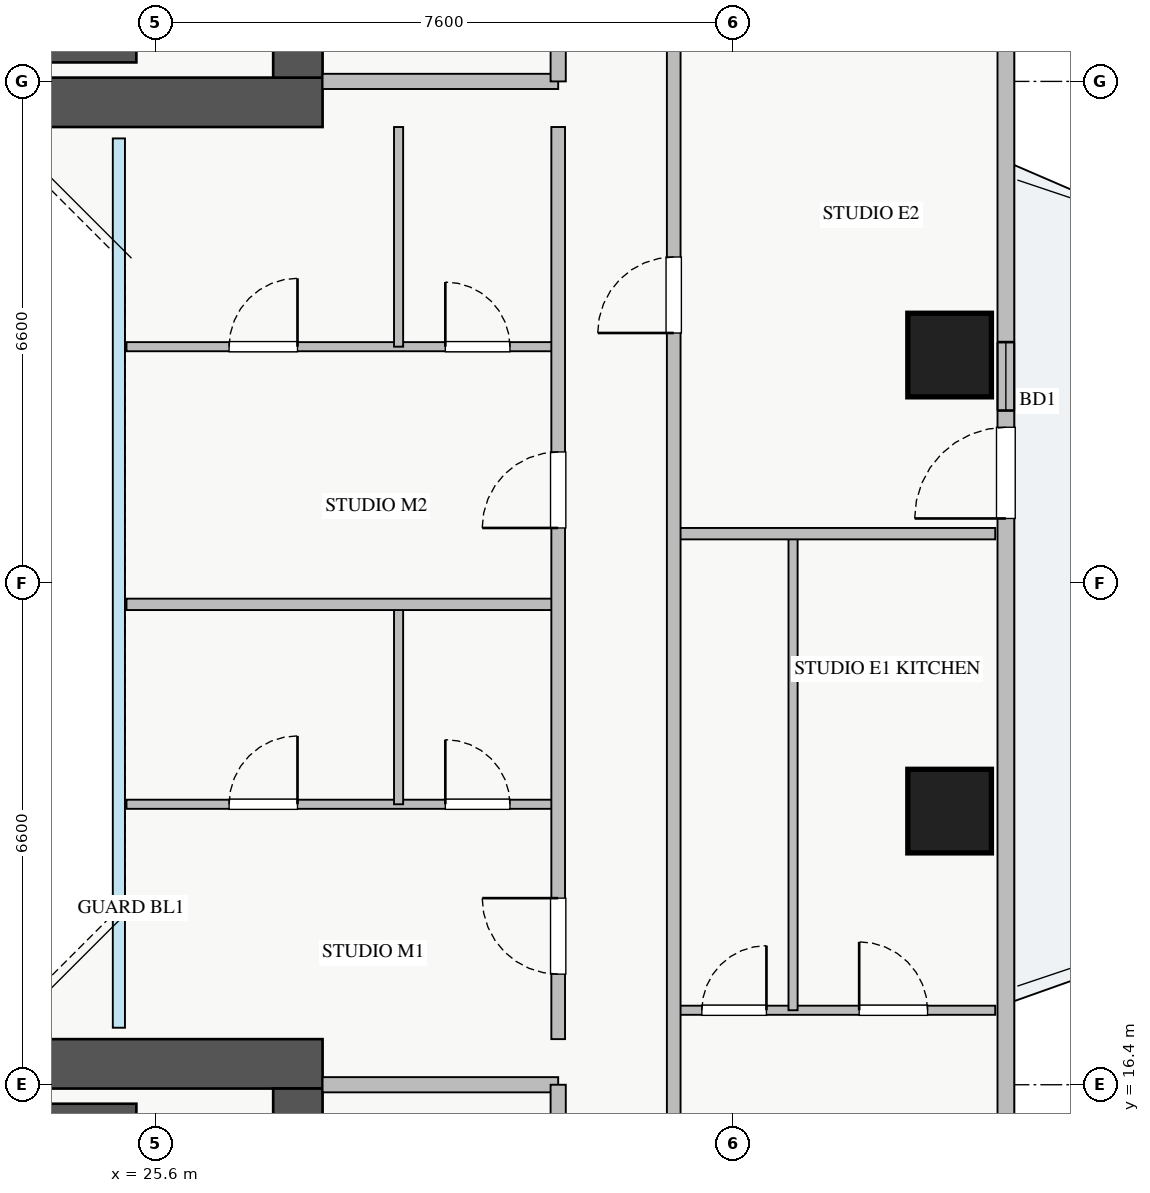
"""IFC4 building model, lengths in metres.
Left out: names, types, materials, properties, quantities, classifications, styles, units other than length and angle.
Written with IfcOpenShell. Run it as: python <this file> out.ifc"""

import sys

from ifc_helpers import new_model, si_unit, direction, frame, frame_2d, origin, origin_2d, place, context, subcontext, project, spatial, rectangle, extrude, source, transform, mapped, element, fill, save


model = new_model("IFC4")
c1 = context("Model", 3, precision=1e-05, world=origin(), true_north=direction((0.0, 1.0)))
c2 = subcontext(c1, "Body", "Model", "MODEL_VIEW")
j1 = project(units=[si_unit("LENGTHUNIT", "METRE"), si_unit("PLANEANGLEUNIT", "RADIAN")], contexts=[c1])
p1 = place(None, origin())
s1 = spatial("IfcSite", under=j1, at=p1, CompositionType="ELEMENT")
p2 = place(p1, origin())
s2 = spatial("IfcBuilding", under=s1, at=p2, CompositionType="ELEMENT")
p3 = place(p2, frame((0.0, 0.0, 119.75)))
s3 = spatial("IfcBuildingStorey", under=s2, at=p3, CompositionType="ELEMENT", Elevation=119.75)
for number, where, z_axis, x_axis in (
    (1, (18.2, 29.95, 0.0), (0.0, 0.0, 1.0), (1.0, 0.0, 0.0)),
    (2, (18.2, 16.05, 0.0), (0.0, 0.0, 1.0), (1.0, 0.0, 0.0)),
):
    element("IfcWall", number, at=place(p3, frame(where, z_axis=z_axis, x_axis=x_axis)), inside=s3, PredefinedType="SHEAR", context=c2, shape_type="SweptSolid", body=[
        extrude(rectangle(XDim=7.15, YDim=0.2, at=frame_2d((3.575, 0.0))), origin(), (0.0, 0.0, 1.0), 3.25),
    ])
p4 = place(p3, frame((10.2, 29.325, 0.0), z_axis=(0.0, 0.0, 1.0), x_axis=(1.0, 0.0, 0.0)))
e3 = element("IfcWall", 3, at=p4, inside=s3, PredefinedType="SHEAR", context=c2, shape_type="SweptSolid", body=[
    extrude(rectangle(XDim=17.6, YDim=0.65, at=frame_2d((8.8, 0.0))), origin(), (0.0, 0.0, 1.0), 3.25),
])
p5 = place(p3, frame((27.475, 29.65, 0.0), z_axis=(0.0, 0.0, 1.0), x_axis=(0.0, 1.0, 0.0)))
e4 = element("IfcWall", 4, at=p5, inside=s3, PredefinedType="SHEAR", context=c2, shape_type="SweptSolid", body=[
    extrude(rectangle(XDim=5.9, YDim=0.65, at=frame_2d((2.95, 0.0))), origin(), (0.0, 0.0, 1.0), 3.25),
])
p6 = place(p5, frame((1.1, 0.0, 0.0)))
e5 = element("IfcOpeningElement", 5, at=p6, cuts=e4, PredefinedType="OPENING", context=c2, shape_type="SweptSolid", body=[
    extrude(rectangle(XDim=1.3, YDim=2.05, at=frame_2d((0.65, 1.025))), frame((0.0, 0.335, 0.0), z_axis=(0.0, -1.0, 0.0), x_axis=(1.0, 0.0, 0.0)), (0.0, 0.0, 1.0), 0.67),
])
p7 = place(p3, frame((10.2, 16.675, 0.0), z_axis=(0.0, 0.0, 1.0), x_axis=(1.0, 0.0, 0.0)))
e6 = element("IfcWall", 6, at=p7, inside=s3, PredefinedType="SHEAR", context=c2, shape_type="SweptSolid", body=[
    extrude(rectangle(XDim=17.6, YDim=0.65, at=frame_2d((8.8, 0.0))), origin(), (0.0, 0.0, 1.0), 3.25),
])
p8 = place(p3, frame((27.475, 10.45, 0.0), z_axis=(0.0, 0.0, 1.0), x_axis=(0.0, 1.0, 0.0)))
e7 = element("IfcWall", 7, at=p8, inside=s3, PredefinedType="SHEAR", context=c2, shape_type="SweptSolid", body=[
    extrude(rectangle(XDim=5.9, YDim=0.65, at=frame_2d((2.95, 0.0))), origin(), (0.0, 0.0, 1.0), 3.25),
])
p9 = place(p8, frame((2.1, 0.0, 0.0)))
e8 = element("IfcOpeningElement", 8, at=p9, cuts=e7, PredefinedType="OPENING", context=c2, shape_type="SweptSolid", body=[
    extrude(rectangle(XDim=1.3, YDim=2.05, at=frame_2d((0.65, 1.025))), frame((0.0, 0.335, 0.0), z_axis=(0.0, -1.0, 0.0), x_axis=(1.0, 0.0, 0.0)), (0.0, 0.0, 1.0), 0.67),
])
m1 = source(origin(), c2, "Body", "SweptSolid", [
    extrude(rectangle(XDim=1.1, YDim=1.1, at=origin_2d()), origin(), (0.0, 0.0, 1.0), 3.25),
])
for number, where, z_axis, x_axis in (
    (9, (36.05, 20.0, 0.0), (0.0, 0.0, 1.0), (1.0, 0.0, 0.0)),
    (10, (36.05, 26.0, 0.0), (0.0, 0.0, 1.0), (1.0, 0.0, 0.0)),
):
    element("IfcColumn", number, at=place(p3, frame(where, z_axis=z_axis, x_axis=x_axis)), inside=s3, PredefinedType="COLUMN", context=c2, shape_type="MappedRepresentation", body=[
        mapped(m1, transform((0.0, 0.0, 0.0), x_axis=(1.0, 0.0, 0.0), y_axis=(0.0, 1.0, 0.0), z_axis=(0.0, 0.0, 1.0), scale=1.0)),
    ])
p10 = place(p3, frame((36.79, 10.55, 0.0), z_axis=(0.0, 0.0, 1.0), x_axis=(0.0, 1.0, 0.0)))
e11 = element("IfcWall", 11, at=p10, inside=s3, PredefinedType="STANDARD", context=c2, shape_type="SweptSolid", body=[
    extrude(rectangle(XDim=24.9, YDim=0.22, at=frame_2d((12.45, 0.0))), origin(), (0.0, 0.0, 1.0), 2.61),
])
p11 = place(p10, frame((13.3, 0.0, 0.0)))
e12 = element("IfcOpeningElement", 12, at=p11, cuts=e11, PredefinedType="OPENING", context=c2, shape_type="SweptSolid", body=[
    extrude(rectangle(XDim=1.2, YDim=2.1, at=frame_2d((0.6, 1.05))), frame((0.0, 0.12, 0.0), z_axis=(0.0, -1.0, 0.0), x_axis=(1.0, 0.0, 0.0)), (0.0, 0.0, 1.0), 0.24),
])
p12 = place(p10, frame((1.912, 0.0, 0.9)))
e13 = element("IfcOpeningElement", 13, at=p12, cuts=e11, PredefinedType="OPENING", context=c2, shape_type="SweptSolid", body=[
    extrude(rectangle(XDim=2.4, YDim=1.48, at=frame_2d((1.2, 0.74))), frame((0.0, 0.12, 0.0), z_axis=(0.0, -1.0, 0.0), x_axis=(1.0, 0.0, 0.0)), (0.0, 0.0, 1.0), 0.24),
])
p13 = place(p10, frame((20.737, 0.0, 0.9)))
e14 = element("IfcOpeningElement", 14, at=p13, cuts=e11, PredefinedType="OPENING", context=c2, shape_type="SweptSolid", body=[
    extrude(rectangle(XDim=2.1, YDim=1.48, at=frame_2d((1.05, 0.74))), frame((0.0, 0.12, 0.0), z_axis=(0.0, -1.0, 0.0), x_axis=(1.0, 0.0, 0.0)), (0.0, 0.0, 1.0), 0.24),
])
p14 = place(p10, frame((14.72, 0.0, 0.9)))
e15 = element("IfcOpeningElement", 15, at=p14, cuts=e11, PredefinedType="OPENING", context=c2, shape_type="SweptSolid", body=[
    extrude(rectangle(XDim=0.9, YDim=1.2, at=frame_2d((0.45, 0.6))), frame((0.0, 0.12, 0.0), z_axis=(0.0, -1.0, 0.0), x_axis=(1.0, 0.0, 0.0)), (0.0, 0.0, 1.0), 0.24),
])
p15 = place(p3, frame((27.8, 29.6, 0.0), z_axis=(0.0, 0.0, 1.0), x_axis=(1.0, 0.0, 0.0)))
e16 = element("IfcWall", 16, at=p15, inside=s3, PredefinedType="PARTITIONING", context=c2, shape_type="SweptSolid", body=[
    extrude(rectangle(XDim=3.1, YDim=0.2, at=frame_2d((1.55, 0.0))), origin(), (0.0, 0.0, 1.0), 3.07),
])
p16 = place(p3, frame((30.9, 29.6, 0.0), z_axis=(0.0, 0.0, 1.0), x_axis=(0.0, 1.0, 0.0)))
e17 = element("IfcWall", 17, at=p16, inside=s3, PredefinedType="PARTITIONING", context=c2, shape_type="SweptSolid", body=[
    extrude(rectangle(XDim=3.9, YDim=0.2, at=frame_2d((1.95, 0.0))), origin(), (0.0, 0.0, 1.0), 3.07),
])
p17 = place(p16, frame((1.4, 0.0, 0.0)))
e18 = element("IfcOpeningElement", 18, at=p17, cuts=e17, PredefinedType="OPENING", context=c2, shape_type="SweptSolid", body=[
    extrude(rectangle(XDim=1.1, YDim=2.05, at=frame_2d((0.55, 1.025))), frame((0.0, 0.11, 0.0), z_axis=(0.0, -1.0, 0.0), x_axis=(1.0, 0.0, 0.0)), (0.0, 0.0, 1.0), 0.22),
])
p18 = place(p3, frame((27.8, 16.4, 0.0), z_axis=(0.0, 0.0, 1.0), x_axis=(1.0, 0.0, 0.0)))
e19 = element("IfcWall", 19, at=p18, inside=s3, PredefinedType="PARTITIONING", context=c2, shape_type="SweptSolid", body=[
    extrude(rectangle(XDim=3.1, YDim=0.2, at=frame_2d((1.55, 0.0))), origin(), (0.0, 0.0, 1.0), 3.07),
])
p19 = place(p3, frame((30.9, 12.5, 0.0), z_axis=(0.0, 0.0, 1.0), x_axis=(0.0, 1.0, 0.0)))
e20 = element("IfcWall", 20, at=p19, inside=s3, PredefinedType="PARTITIONING", context=c2, shape_type="SweptSolid", body=[
    extrude(rectangle(XDim=3.9, YDim=0.2, at=frame_2d((1.95, 0.0))), origin(), (0.0, 0.0, 1.0), 3.07),
])
p20 = place(p19, frame((1.4, 0.0, 0.0)))
e21 = element("IfcOpeningElement", 21, at=p20, cuts=e20, PredefinedType="OPENING", context=c2, shape_type="SweptSolid", body=[
    extrude(rectangle(XDim=1.1, YDim=2.05, at=frame_2d((0.55, 1.025))), frame((0.0, 0.11, 0.0), z_axis=(0.0, -1.0, 0.0), x_axis=(1.0, 0.0, 0.0)), (0.0, 0.0, 1.0), 0.22),
])
p21 = place(p3, frame((32.42, 17.38, 0.0), z_axis=(0.0, 0.0, 1.0), x_axis=(1.0, 0.0, 0.0)))
e22 = element("IfcWall", 22, at=p21, inside=s3, PredefinedType="PLUMBINGWALL", context=c2, shape_type="SweptSolid", body=[
    extrude(rectangle(XDim=4.23, YDim=0.12, at=frame_2d((2.115, 0.0))), origin(), (0.0, 0.0, 1.0), 3.07),
])
p22 = place(p21, frame((0.37, 0.0, 0.0)))
e23 = element("IfcOpeningElement", 23, at=p22, cuts=e22, PredefinedType="OPENING", context=c2, shape_type="SweptSolid", body=[
    extrude(rectangle(XDim=0.85, YDim=2.05, at=frame_2d((0.425, 1.025))), frame((0.0, 0.07, 0.0), z_axis=(0.0, -1.0, 0.0), x_axis=(1.0, 0.0, 0.0)), (0.0, 0.0, 1.0), 0.14),
])
p23 = place(p21, frame((2.44, 0.0, 0.0)))
e24 = element("IfcOpeningElement", 24, at=p23, cuts=e22, PredefinedType="OPENING", context=c2, shape_type="SweptSolid", body=[
    extrude(rectangle(XDim=0.9, YDim=2.05, at=frame_2d((0.45, 1.025))), frame((0.0, 0.07, 0.0), z_axis=(0.0, -1.0, 0.0), x_axis=(1.0, 0.0, 0.0)), (0.0, 0.0, 1.0), 0.14),
])
p24 = place(p3, frame((33.99, 17.38, 0.0), z_axis=(0.0, 0.0, 1.0), x_axis=(0.0, 1.0, 0.0)))
e25 = element("IfcWall", 25, at=p24, inside=s3, PredefinedType="PLUMBINGWALL", context=c2, shape_type="SweptSolid", body=[
    extrude(rectangle(XDim=6.27, YDim=0.12, at=frame_2d((3.135, 0.0))), origin(), (0.0, 0.0, 1.0), 3.07),
])
p25 = place(p3, frame((32.42, 23.65, 0.0), z_axis=(0.0, 0.0, 1.0), x_axis=(1.0, 0.0, 0.0)))
e26 = element("IfcWall", 26, at=p25, inside=s3, PredefinedType="PARTITIONING", context=c2, shape_type="SweptSolid", body=[
    extrude(rectangle(XDim=4.23, YDim=0.15, at=frame_2d((2.115, 0.0))), origin(), (0.0, 0.0, 1.0), 3.07),
])
p26 = place(p3, frame((32.42, 8.25, 0.0), z_axis=(0.0, 0.0, 1.0), x_axis=(0.0, 1.0, 0.0)))
e27 = element("IfcWall", 27, at=p26, inside=s3, PredefinedType="PARTITIONING", context=c2, shape_type="SweptSolid", body=[
    extrude(rectangle(XDim=29.5, YDim=0.18, at=frame_2d((14.75, 0.0))), origin(), (0.0, 0.0, 1.0), 3.07),
])
p27 = place(p26, frame((28.155, 0.0, 0.0)))
e28 = element("IfcOpeningElement", 28, at=p27, cuts=e27, PredefinedType="OPENING", context=c2, shape_type="SweptSolid", body=[
    extrude(rectangle(XDim=0.9, YDim=2.05, at=frame_2d((0.45, 1.025))), frame((0.0, 0.1, 0.0), z_axis=(0.0, -1.0, 0.0), x_axis=(1.0, 0.0, 0.0)), (0.0, 0.0, 1.0), 0.2),
])
p28 = place(p26, frame((0.445, 0.0, 0.0)))
e29 = element("IfcOpeningElement", 29, at=p28, cuts=e27, PredefinedType="OPENING", context=c2, shape_type="SweptSolid", body=[
    extrude(rectangle(XDim=0.9, YDim=2.05, at=frame_2d((0.45, 1.025))), frame((0.0, 0.1, 0.0), z_axis=(0.0, -1.0, 0.0), x_axis=(1.0, 0.0, 0.0)), (0.0, 0.0, 1.0), 0.2),
])
p29 = place(p26, frame((4.76, 0.0, 0.0)))
e30 = element("IfcOpeningElement", 30, at=p29, cuts=e27, PredefinedType="OPENING", context=c2, shape_type="SweptSolid", body=[
    extrude(rectangle(XDim=1.0, YDim=2.05, at=frame_2d((0.5, 1.025))), frame((0.0, 0.1, 0.0), z_axis=(0.0, -1.0, 0.0), x_axis=(1.0, 0.0, 0.0)), (0.0, 0.0, 1.0), 0.2),
])
p30 = place(p26, frame((18.04, 0.0, 0.0)))
e31 = element("IfcOpeningElement", 31, at=p30, cuts=e27, PredefinedType="OPENING", context=c2, shape_type="SweptSolid", body=[
    extrude(rectangle(XDim=1.0, YDim=2.05, at=frame_2d((0.5, 1.025))), frame((0.0, 0.1, 0.0), z_axis=(0.0, -1.0, 0.0), x_axis=(1.0, 0.0, 0.0)), (0.0, 0.0, 1.0), 0.2),
])
p31 = place(p3, frame((25.22, 20.09, 0.0), z_axis=(0.0, 0.0, 1.0), x_axis=(1.0, 0.0, 0.0)))
e32 = element("IfcWall", 32, at=p31, inside=s3, PredefinedType="PLUMBINGWALL", context=c2, shape_type="SweptSolid", body=[
    extrude(rectangle(XDim=5.68, YDim=0.12, at=frame_2d((2.84, 0.0))), origin(), (0.0, 0.0, 1.0), 2.625),
])
p32 = place(p31, frame((1.35, 0.0, 0.0)))
e33 = element("IfcOpeningElement", 33, at=p32, cuts=e32, PredefinedType="OPENING", context=c2, shape_type="SweptSolid", body=[
    extrude(rectangle(XDim=0.9, YDim=2.05, at=frame_2d((0.45, 1.025))), frame((0.0, 0.07, 0.0), z_axis=(0.0, -1.0, 0.0), x_axis=(1.0, 0.0, 0.0)), (0.0, 0.0, 1.0), 0.14),
])
p33 = place(p31, frame((4.195, 0.0, 0.0)))
e34 = element("IfcOpeningElement", 34, at=p33, cuts=e32, PredefinedType="OPENING", context=c2, shape_type="SweptSolid", body=[
    extrude(rectangle(XDim=0.85, YDim=2.05, at=frame_2d((0.425, 1.025))), frame((0.0, 0.07, 0.0), z_axis=(0.0, -1.0, 0.0), x_axis=(1.0, 0.0, 0.0)), (0.0, 0.0, 1.0), 0.14),
])
p34 = place(p3, frame((28.8, 20.09, 0.0), z_axis=(0.0, 0.0, 1.0), x_axis=(0.0, 1.0, 0.0)))
e35 = element("IfcWall", 35, at=p34, inside=s3, PredefinedType="PLUMBINGWALL", context=c2, shape_type="SweptSolid", body=[
    extrude(rectangle(XDim=2.63, YDim=0.12, at=frame_2d((1.315, 0.0))), origin(), (0.0, 0.0, 1.0), 3.07),
])
p35 = place(p3, frame((25.22, 26.11, 0.0), z_axis=(0.0, 0.0, 1.0), x_axis=(1.0, 0.0, 0.0)))
e36 = element("IfcWall", 36, at=p35, inside=s3, PredefinedType="PLUMBINGWALL", context=c2, shape_type="SweptSolid", body=[
    extrude(rectangle(XDim=5.68, YDim=0.12, at=frame_2d((2.84, 0.0))), origin(), (0.0, 0.0, 1.0), 2.625),
])
p36 = place(p35, frame((1.35, 0.0, 0.0)))
e37 = element("IfcOpeningElement", 37, at=p36, cuts=e36, PredefinedType="OPENING", context=c2, shape_type="SweptSolid", body=[
    extrude(rectangle(XDim=0.9, YDim=2.05, at=frame_2d((0.45, 1.025))), frame((0.0, 0.07, 0.0), z_axis=(0.0, -1.0, 0.0), x_axis=(1.0, 0.0, 0.0)), (0.0, 0.0, 1.0), 0.14),
])
p37 = place(p35, frame((4.195, 0.0, 0.0)))
e38 = element("IfcOpeningElement", 38, at=p37, cuts=e36, PredefinedType="OPENING", context=c2, shape_type="SweptSolid", body=[
    extrude(rectangle(XDim=0.85, YDim=2.05, at=frame_2d((0.425, 1.025))), frame((0.0, 0.07, 0.0), z_axis=(0.0, -1.0, 0.0), x_axis=(1.0, 0.0, 0.0)), (0.0, 0.0, 1.0), 0.14),
])
p38 = place(p3, frame((28.8, 26.11, 0.0), z_axis=(0.0, 0.0, 1.0), x_axis=(0.0, 1.0, 0.0)))
e39 = element("IfcWall", 39, at=p38, inside=s3, PredefinedType="PLUMBINGWALL", context=c2, shape_type="SweptSolid", body=[
    extrude(rectangle(XDim=2.89, YDim=0.12, at=frame_2d((1.445, 0.0))), origin(), (0.0, 0.0, 1.0), 3.07),
])
p39 = place(p3, frame((25.22, 22.72, 0.0), z_axis=(0.0, 0.0, 1.0), x_axis=(1.0, 0.0, 0.0)))
e40 = element("IfcWall", 40, at=p39, inside=s3, PredefinedType="PARTITIONING", context=c2, shape_type="SweptSolid", body=[
    extrude(rectangle(XDim=5.68, YDim=0.15, at=frame_2d((2.84, 0.0))), origin(), (0.0, 0.0, 1.0), 3.07),
])
p40 = place(p3, frame((30.9, 17.0, 0.0), z_axis=(0.0, 0.0, 1.0), x_axis=(0.0, 1.0, 0.0)))
e41 = element("IfcWall", 41, at=p40, inside=s3, PredefinedType="PARTITIONING", context=c2, shape_type="SweptSolid", body=[
    extrude(rectangle(XDim=12.0, YDim=0.18, at=frame_2d((6.0, 0.0))), origin(), (0.0, 0.0, 1.0), 3.07),
])
p41 = place(p40, frame((0.855, 0.0, 0.0)))
e42 = element("IfcOpeningElement", 42, at=p41, cuts=e41, PredefinedType="OPENING", context=c2, shape_type="SweptSolid", body=[
    extrude(rectangle(XDim=1.0, YDim=2.05, at=frame_2d((0.5, 1.025))), frame((0.0, 0.1, 0.0), z_axis=(0.0, -1.0, 0.0), x_axis=(1.0, 0.0, 0.0)), (0.0, 0.0, 1.0), 0.2),
])
p42 = place(p40, frame((6.725, 0.0, 0.0)))
e43 = element("IfcOpeningElement", 43, at=p42, cuts=e41, PredefinedType="OPENING", context=c2, shape_type="SweptSolid", body=[
    extrude(rectangle(XDim=1.0, YDim=2.05, at=frame_2d((0.5, 1.025))), frame((0.0, 0.1, 0.0), z_axis=(0.0, -1.0, 0.0), x_axis=(1.0, 0.0, 0.0)), (0.0, 0.0, 1.0), 0.2),
])
m2 = source(origin(), c2, "Body", "SweptSolid", [
    extrude(rectangle(XDim=1.2, YDim=2.1, at=frame_2d((0.6, 1.05))), frame((0.0, 0.025, 0.0), z_axis=(0.0, -1.0, 0.0), x_axis=(1.0, 0.0, 0.0)), (0.0, 0.0, 1.0), 0.05),
])
p43 = place(p11, origin())
e44 = element("IfcDoor", 44, at=p43, inside=s3, OperationType="SINGLE_SWING_LEFT", PredefinedType="DOOR", context=c2, shape_type="MappedRepresentation", body=[
    mapped(m2, transform((0.0, 0.0, 0.0), x_axis=(1.0, 0.0, 0.0), y_axis=(0.0, 1.0, 0.0), z_axis=(0.0, 0.0, 1.0), scale=1.0)),
])
fill(e12, e44)
m3 = source(origin(), c2, "Body", "SweptSolid", [
    extrude(rectangle(XDim=0.85, YDim=2.05, at=frame_2d((0.425, 1.025))), frame((0.0, 0.025, 0.0), z_axis=(0.0, -1.0, 0.0), x_axis=(1.0, 0.0, 0.0)), (0.0, 0.0, 1.0), 0.05),
])
p44 = place(p22, origin())
e45 = element("IfcDoor", 45, at=p44, inside=s3, OperationType="SINGLE_SWING_RIGHT", PredefinedType="DOOR", context=c2, shape_type="MappedRepresentation", body=[
    mapped(m3, transform((0.0, 0.0, 0.0), x_axis=(1.0, 0.0, 0.0), y_axis=(0.0, 1.0, 0.0), z_axis=(0.0, 0.0, 1.0), scale=1.0)),
])
fill(e23, e45)
m4 = source(origin(), c2, "Body", "SweptSolid", [
    extrude(rectangle(XDim=0.9, YDim=2.05, at=frame_2d((0.45, 1.025))), frame((0.0, 0.025, 0.0), z_axis=(0.0, -1.0, 0.0), x_axis=(1.0, 0.0, 0.0)), (0.0, 0.0, 1.0), 0.05),
])
p45 = place(p23, origin())
e46 = element("IfcDoor", 46, at=p45, inside=s3, OperationType="SINGLE_SWING_LEFT", PredefinedType="DOOR", context=c2, shape_type="MappedRepresentation", body=[
    mapped(m4, transform((0.0, 0.0, 0.0), x_axis=(1.0, 0.0, 0.0), y_axis=(0.0, 1.0, 0.0), z_axis=(0.0, 0.0, 1.0), scale=1.0)),
])
fill(e24, e46)
m5 = source(origin(), c2, "Body", "SweptSolid", [
    extrude(rectangle(XDim=1.0, YDim=2.05, at=frame_2d((0.5, 1.025))), frame((0.0, 0.025, 0.0), z_axis=(0.0, -1.0, 0.0), x_axis=(1.0, 0.0, 0.0)), (0.0, 0.0, 1.0), 0.05),
])
p46 = place(p30, origin())
e47 = element("IfcDoor", 47, at=p46, inside=s3, OperationType="SINGLE_SWING_LEFT", PredefinedType="DOOR", context=c2, shape_type="MappedRepresentation", body=[
    mapped(m5, transform((0.0, 0.0, 0.0), x_axis=(1.0, 0.0, 0.0), y_axis=(0.0, 1.0, 0.0), z_axis=(0.0, 0.0, 1.0), scale=1.0)),
])
fill(e31, e47)
p47 = place(p32, origin())
e48 = element("IfcDoor", 48, at=p47, inside=s3, OperationType="SINGLE_SWING_RIGHT", PredefinedType="DOOR", context=c2, shape_type="MappedRepresentation", body=[
    mapped(m4, transform((0.0, 0.0, 0.0), x_axis=(1.0, 0.0, 0.0), y_axis=(0.0, 1.0, 0.0), z_axis=(0.0, 0.0, 1.0), scale=1.0)),
])
fill(e33, e48)
p48 = place(p33, origin())
e49 = element("IfcDoor", 49, at=p48, inside=s3, OperationType="SINGLE_SWING_LEFT", PredefinedType="DOOR", context=c2, shape_type="MappedRepresentation", body=[
    mapped(m3, transform((0.0, 0.0, 0.0), x_axis=(1.0, 0.0, 0.0), y_axis=(0.0, 1.0, 0.0), z_axis=(0.0, 0.0, 1.0), scale=1.0)),
])
fill(e34, e49)
p49 = place(p36, origin())
e50 = element("IfcDoor", 50, at=p49, inside=s3, OperationType="SINGLE_SWING_RIGHT", PredefinedType="DOOR", context=c2, shape_type="MappedRepresentation", body=[
    mapped(m4, transform((0.0, 0.0, 0.0), x_axis=(1.0, 0.0, 0.0), y_axis=(0.0, 1.0, 0.0), z_axis=(0.0, 0.0, 1.0), scale=1.0)),
])
fill(e37, e50)
p50 = place(p37, origin())
e51 = element("IfcDoor", 51, at=p50, inside=s3, OperationType="SINGLE_SWING_LEFT", PredefinedType="DOOR", context=c2, shape_type="MappedRepresentation", body=[
    mapped(m3, transform((0.0, 0.0, 0.0), x_axis=(1.0, 0.0, 0.0), y_axis=(0.0, 1.0, 0.0), z_axis=(0.0, 0.0, 1.0), scale=1.0)),
])
fill(e38, e51)
p51 = place(p41, origin())
e52 = element("IfcDoor", 52, at=p51, inside=s3, OperationType="SINGLE_SWING_RIGHT", PredefinedType="DOOR", context=c2, shape_type="MappedRepresentation", body=[
    mapped(m5, transform((0.0, 0.0, 0.0), x_axis=(1.0, 0.0, 0.0), y_axis=(0.0, 1.0, 0.0), z_axis=(0.0, 0.0, 1.0), scale=1.0)),
])
fill(e42, e52)
p52 = place(p42, origin())
e53 = element("IfcDoor", 53, at=p52, inside=s3, OperationType="SINGLE_SWING_LEFT", PredefinedType="DOOR", context=c2, shape_type="MappedRepresentation", body=[
    mapped(m5, transform((0.0, 0.0, 0.0), x_axis=(1.0, 0.0, 0.0), y_axis=(0.0, 1.0, 0.0), z_axis=(0.0, 0.0, 1.0), scale=1.0)),
])
fill(e43, e53)
m6 = source(origin(), c2, "Body", "SweptSolid", [
    extrude(rectangle(XDim=0.9, YDim=1.2, at=frame_2d((0.45, 0.6))), frame((0.0, 0.03, 0.0), z_axis=(0.0, -1.0, 0.0), x_axis=(1.0, 0.0, 0.0)), (0.0, 0.0, 1.0), 0.06),
])
p53 = place(p14, origin())
e54 = element("IfcWindow", 54, at=p53, inside=s3, PartitioningType="SINGLE_PANEL", PredefinedType="WINDOW", context=c2, shape_type="MappedRepresentation", body=[
    mapped(m6, transform((0.0, 0.0, 0.0), x_axis=(1.0, 0.0, 0.0), y_axis=(0.0, 1.0, 0.0), z_axis=(0.0, 0.0, 1.0), scale=1.0)),
])
fill(e15, e54)
save(model, sys.argv[1])
